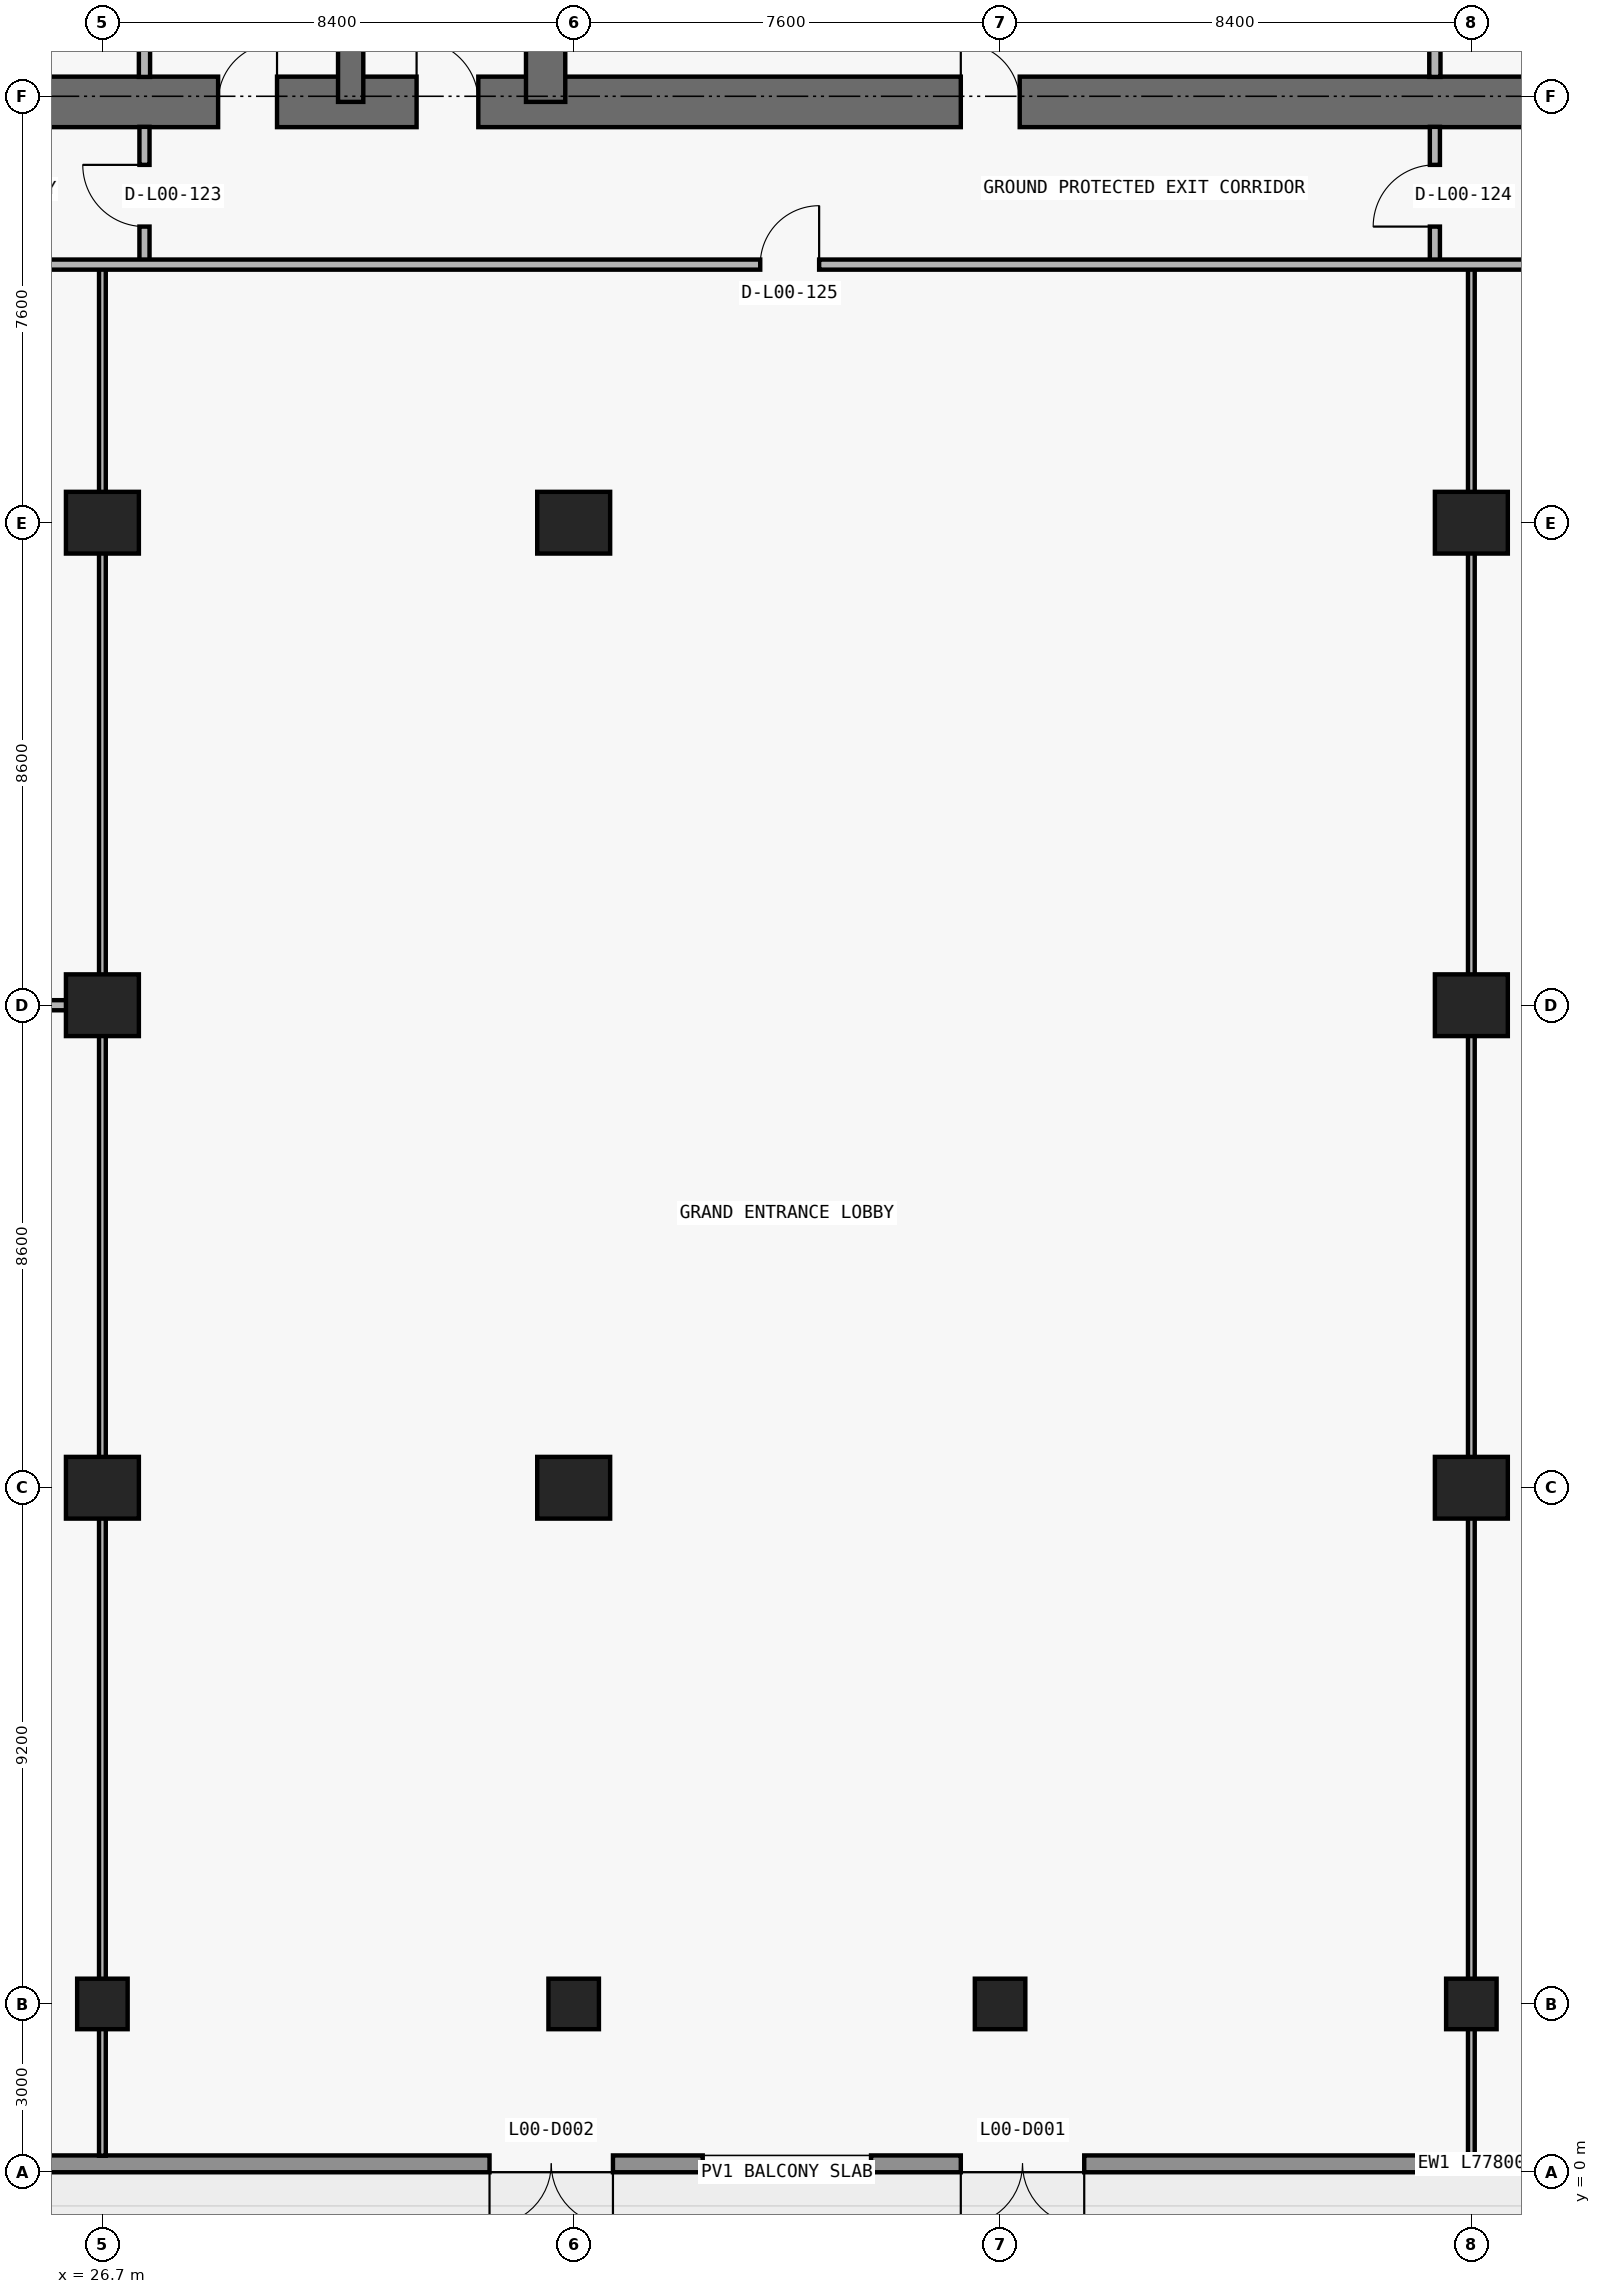
"""IFC4 building model, lengths in metres.
Left out: names, types, materials, properties, quantities, classifications, styles, units other than length and angle.
Written with IfcOpenShell. Run it as: python <this file> out.ifc"""

import sys

from ifc_helpers import new_model, si_unit, direction, frame, frame_2d, origin, origin_2d, place, context, subcontext, project, spatial, rectangle, circle, extrude, element, fill, save


model = new_model("IFC4")
c1 = context("Model", 3, precision=1e-05, world=origin(), true_north=direction((0.0, 1.0)))
c2 = subcontext(c1, "Body", "Model", "MODEL_VIEW")
j1 = project(units=[si_unit("LENGTHUNIT", "METRE"), si_unit("PLANEANGLEUNIT", "RADIAN")], contexts=[c1])
p1 = place(None, origin())
s1 = spatial("IfcSite", under=j1, at=p1, CompositionType="ELEMENT")
p2 = place(p1, origin())
s2 = spatial("IfcBuilding", under=s1, at=p2, CompositionType="ELEMENT")
p3 = place(p2, origin())
s3 = spatial("IfcBuildingStorey", under=s2, at=p3, CompositionType="ELEMENT", Elevation=0.0)
for number, where, z_axis, x_axis in (
    (1, (26.7, 3.0, 0.0), (0.0, 0.0, 1.0), (1.0, 0.0, 0.0)),
    (2, (35.1, 3.0, 0.0), (0.0, 0.0, 1.0), (1.0, 0.0, 0.0)),
    (3, (42.7, 3.0, 0.0), (0.0, 0.0, 1.0), (1.0, 0.0, 0.0)),
    (4, (51.1, 3.0, 0.0), (0.0, 0.0, 1.0), (1.0, 0.0, 0.0)),
):
    element("IfcColumn", number, at=place(p3, frame(where, z_axis=z_axis, x_axis=x_axis)), inside=s3, PredefinedType="COLUMN", context=c2, shape_type="SweptSolid", body=[
        extrude(circle(Radius=0.45, at=origin_2d()), origin(), (0.0, 0.0, 1.0), 5.1),
    ])
for number, where, z_axis, x_axis in (
    (5, (26.7, 12.2, 0.0), (0.0, 0.0, 1.0), (1.0, 0.0, 0.0)),
    (6, (35.1, 12.2, 0.0), (0.0, 0.0, 1.0), (1.0, 0.0, 0.0)),
    (7, (51.1, 12.2, 0.0), (0.0, 0.0, 1.0), (1.0, 0.0, 0.0)),
    (8, (26.7, 20.8, 0.0), (0.0, 0.0, 1.0), (1.0, 0.0, 0.0)),
    (9, (51.1, 20.8, 0.0), (0.0, 0.0, 1.0), (1.0, 0.0, 0.0)),
    (10, (26.7, 29.4, 0.0), (0.0, 0.0, 1.0), (1.0, 0.0, 0.0)),
    (11, (35.1, 29.4, 0.0), (0.0, 0.0, 1.0), (1.0, 0.0, 0.0)),
    (12, (51.1, 29.4, 0.0), (0.0, 0.0, 1.0), (1.0, 0.0, 0.0)),
):
    element("IfcColumn", number, at=place(p3, frame(where, z_axis=z_axis, x_axis=x_axis)), inside=s3, PredefinedType="COLUMN", context=c2, shape_type="SweptSolid", body=[
        extrude(rectangle(XDim=1.3, YDim=1.1, at=origin_2d()), origin(), (0.0, 0.0, 1.0), 5.1),
    ])
p4 = place(p3, frame((17.75, 36.9, 0.0), z_axis=(0.0, 0.0, 1.0), x_axis=(1.0, 0.0, 0.0)))
e13 = element("IfcWall", 13, at=p4, inside=s3, PredefinedType="SHEAR", context=c2, shape_type="SweptSolid", body=[
    extrude(rectangle(XDim=42.3, YDim=0.9, at=frame_2d((21.15, 0.0))), origin(), (0.0, 0.0, 1.0), 5.1),
])
p5 = place(p4, frame((14.55, 0.0, 0.0)))
e14 = element("IfcOpeningElement", 14, at=p5, cuts=e13, PredefinedType="OPENING", context=c2, shape_type="SweptSolid", body=[
    extrude(rectangle(XDim=1.1, YDim=2.15, at=frame_2d((0.55, 1.075))), frame((0.0, 0.46, 0.0), z_axis=(0.0, -1.0, 0.0), x_axis=(1.0, 0.0, 0.0)), (0.0, 0.0, 1.0), 0.92),
])
p6 = place(p4, frame((6.4, 0.0, 0.0)))
e15 = element("IfcOpeningElement", 15, at=p6, cuts=e13, PredefinedType="OPENING", context=c2, shape_type="SweptSolid", body=[
    extrude(rectangle(XDim=1.05, YDim=2.15, at=frame_2d((0.525, 1.075))), frame((0.0, 0.46, 0.0), z_axis=(0.0, -1.0, 0.0), x_axis=(1.0, 0.0, 0.0)), (0.0, 0.0, 1.0), 0.92),
])
p7 = place(p4, frame((34.9, 0.0, 0.0)))
e16 = element("IfcOpeningElement", 16, at=p7, cuts=e13, PredefinedType="OPENING", context=c2, shape_type="SweptSolid", body=[
    extrude(rectangle(XDim=1.05, YDim=2.15, at=frame_2d((0.525, 1.075))), frame((0.0, 0.46, 0.0), z_axis=(0.0, -1.0, 0.0), x_axis=(1.0, 0.0, 0.0)), (0.0, 0.0, 1.0), 0.92),
])
p8 = place(p4, frame((11.012, 0.0, 0.0)))
e17 = element("IfcOpeningElement", 17, at=p8, cuts=e13, PredefinedType="OPENING", context=c2, shape_type="SweptSolid", body=[
    extrude(rectangle(XDim=1.05, YDim=2.15, at=frame_2d((0.525, 1.075))), frame((0.0, 0.46, 0.0), z_axis=(0.0, -1.0, 0.0), x_axis=(1.0, 0.0, 0.0)), (0.0, 0.0, 1.0), 0.92),
])
p9 = place(p4, frame((24.25, 0.0, 0.0)))
e18 = element("IfcOpeningElement", 18, at=p9, cuts=e13, PredefinedType="OPENING", context=c2, shape_type="SweptSolid", body=[
    extrude(rectangle(XDim=1.05, YDim=2.15, at=frame_2d((0.525, 1.075))), frame((0.0, 0.46, 0.0), z_axis=(0.0, -1.0, 0.0), x_axis=(1.0, 0.0, 0.0)), (0.0, 0.0, 1.0), 0.92),
])
p10 = place(p3, frame((31.125, 36.9, 0.0), z_axis=(0.0, 0.0, 1.0), x_axis=(0.0, 1.0, 0.0)))
e19 = element("IfcWall", 19, at=p10, inside=s3, PredefinedType="SHEAR", context=c2, shape_type="SweptSolid", body=[
    extrude(rectangle(XDim=9.675, YDim=0.45, at=frame_2d((4.837, 0.0))), origin(), (0.0, 0.0, 1.0), 5.1),
])
p11 = place(p3, frame((34.6, 36.9, 0.0), z_axis=(0.0, 0.0, 1.0), x_axis=(0.0, 1.0, 0.0)))
e20 = element("IfcWall", 20, at=p11, inside=s3, PredefinedType="SHEAR", context=c2, shape_type="SweptSolid", body=[
    extrude(rectangle(XDim=9.675, YDim=0.7, at=frame_2d((4.837, 0.0))), origin(), (0.0, 0.0, 1.0), 5.1),
])
p12 = place(p3, frame((77.8, 0.15, 0.0), z_axis=(0.0, 0.0, 1.0), x_axis=(-1.0, 0.0, 0.0)))
e21 = element("IfcWall", 21, at=p12, inside=s3, PredefinedType="STANDARD", context=c2, shape_type="SweptSolid", body=[
    extrude(rectangle(XDim=77.8, YDim=0.3, at=frame_2d((38.9, 0.0))), origin(), (0.0, 0.0, 1.0), 5.1),
])
p13 = place(p12, frame((2.6, 0.0, 0.0)))
e22 = element("IfcOpeningElement", 22, at=p13, cuts=e21, PredefinedType="OPENING", context=c2, shape_type="SweptSolid", body=[
    extrude(rectangle(XDim=3.6, YDim=3.8, at=frame_2d((1.8, 1.9))), frame((0.0, 0.16, 0.0), z_axis=(0.0, -1.0, 0.0), x_axis=(1.0, 0.0, 0.0)), (0.0, 0.0, 1.0), 0.32),
])
p14 = place(p12, frame((17.6, 0.0, 0.0)))
e23 = element("IfcOpeningElement", 23, at=p14, cuts=e21, PredefinedType="OPENING", context=c2, shape_type="SweptSolid", body=[
    extrude(rectangle(XDim=2.2, YDim=2.6, at=frame_2d((1.1, 1.3))), frame((0.0, 0.16, 0.0), z_axis=(0.0, -1.0, 0.0), x_axis=(1.0, 0.0, 0.0)), (0.0, 0.0, 1.0), 0.32),
])
p15 = place(p12, frame((12.0, 0.0, 0.6)))
e24 = element("IfcOpeningElement", 24, at=p15, cuts=e21, PredefinedType="OPENING", context=c2, shape_type="SweptSolid", body=[
    extrude(rectangle(XDim=3.0, YDim=2.4, at=frame_2d((1.5, 1.2))), frame((0.0, 0.16, 0.0), z_axis=(0.0, -1.0, 0.0), x_axis=(1.0, 0.0, 0.0)), (0.0, 0.0, 1.0), 0.32),
])
p16 = place(p12, frame((33.6, 0.0, 0.0)))
e25 = element("IfcOpeningElement", 25, at=p16, cuts=e21, PredefinedType="OPENING", context=c2, shape_type="SweptSolid", body=[
    extrude(rectangle(XDim=2.2, YDim=2.6, at=frame_2d((1.1, 1.3))), frame((0.0, 0.16, 0.0), z_axis=(0.0, -1.0, 0.0), x_axis=(1.0, 0.0, 0.0)), (0.0, 0.0, 1.0), 0.32),
])
p17 = place(p12, frame((42.0, 0.0, 0.0)))
e26 = element("IfcOpeningElement", 26, at=p17, cuts=e21, PredefinedType="OPENING", context=c2, shape_type="SweptSolid", body=[
    extrude(rectangle(XDim=2.2, YDim=2.6, at=frame_2d((1.1, 1.3))), frame((0.0, 0.16, 0.0), z_axis=(0.0, -1.0, 0.0), x_axis=(1.0, 0.0, 0.0)), (0.0, 0.0, 1.0), 0.32),
])
p18 = place(p12, frame((37.4, 0.0, 0.6)))
e27 = element("IfcOpeningElement", 27, at=p18, cuts=e21, PredefinedType="OPENING", context=c2, shape_type="SweptSolid", body=[
    extrude(rectangle(XDim=3.0, YDim=2.4, at=frame_2d((1.5, 1.2))), frame((0.0, 0.16, 0.0), z_axis=(0.0, -1.0, 0.0), x_axis=(1.0, 0.0, 0.0)), (0.0, 0.0, 1.0), 0.32),
])
p19 = place(p12, frame((63.6, 0.0, 0.0)))
e28 = element("IfcOpeningElement", 28, at=p19, cuts=e21, PredefinedType="OPENING", context=c2, shape_type="SweptSolid", body=[
    extrude(rectangle(XDim=2.2, YDim=2.6, at=frame_2d((1.1, 1.3))), frame((0.0, 0.16, 0.0), z_axis=(0.0, -1.0, 0.0), x_axis=(1.0, 0.0, 0.0)), (0.0, 0.0, 1.0), 0.32),
])
p20 = place(p12, frame((56.0, 0.0, 0.6)))
e29 = element("IfcOpeningElement", 29, at=p20, cuts=e21, PredefinedType="OPENING", context=c2, shape_type="SweptSolid", body=[
    extrude(rectangle(XDim=3.0, YDim=2.4, at=frame_2d((1.5, 1.2))), frame((0.0, 0.16, 0.0), z_axis=(0.0, -1.0, 0.0), x_axis=(1.0, 0.0, 0.0)), (0.0, 0.0, 1.0), 0.32),
])
p21 = place(p3, frame((26.7, 0.295, 0.0), z_axis=(0.0, 0.0, 1.0), x_axis=(0.0, 1.0, 0.0)))
e30 = element("IfcWall", 30, at=p21, inside=s3, PredefinedType="PARTITIONING", context=c2, shape_type="SweptSolid", body=[
    extrude(rectangle(XDim=33.705, YDim=0.12, at=frame_2d((16.853, 0.0))), origin(), (0.0, 0.0, 1.0), 4.064),
])
p22 = place(p3, frame((27.45, 34.0, 0.0), z_axis=(0.0, 0.0, 1.0), x_axis=(0.0, 1.0, 0.0)))
e31 = element("IfcWall", 31, at=p22, inside=s3, PredefinedType="PARTITIONING", context=c2, shape_type="SweptSolid", body=[
    extrude(rectangle(XDim=2.455, YDim=0.18, at=frame_2d((1.228, 0.0))), origin(), (0.0, 0.0, 1.0), 5.1),
])
p23 = place(p22, frame((0.677, 0.0, 0.0)))
e32 = element("IfcOpeningElement", 32, at=p23, cuts=e31, PredefinedType="OPENING", context=c2, shape_type="SweptSolid", body=[
    extrude(rectangle(XDim=1.1, YDim=2.15, at=frame_2d((0.55, 1.075))), frame((0.0, 0.1, 0.0), z_axis=(0.0, -1.0, 0.0), x_axis=(1.0, 0.0, 0.0)), (0.0, 0.0, 1.0), 0.2),
])
p24 = place(p3, frame((27.45, 37.345, 0.0), z_axis=(0.0, 0.0, 1.0), x_axis=(0.0, 1.0, 0.0)))
e33 = element("IfcWall", 33, at=p24, inside=s3, PredefinedType="PARTITIONING", context=c2, shape_type="SweptSolid", body=[
    extrude(rectangle(XDim=5.385, YDim=0.2, at=frame_2d((2.692, 0.0))), origin(), (0.0, 0.0, 1.0), 5.1),
])
p25 = place(p3, frame((50.45, 34.0, 0.0), z_axis=(0.0, 0.0, 1.0), x_axis=(0.0, 1.0, 0.0)))
e34 = element("IfcWall", 34, at=p25, inside=s3, PredefinedType="PARTITIONING", context=c2, shape_type="SweptSolid", body=[
    extrude(rectangle(XDim=2.455, YDim=0.18, at=frame_2d((1.228, 0.0))), origin(), (0.0, 0.0, 1.0), 5.1),
])
p26 = place(p25, frame((0.677, 0.0, 0.0)))
e35 = element("IfcOpeningElement", 35, at=p26, cuts=e34, PredefinedType="OPENING", context=c2, shape_type="SweptSolid", body=[
    extrude(rectangle(XDim=1.1, YDim=2.15, at=frame_2d((0.55, 1.075))), frame((0.0, 0.1, 0.0), z_axis=(0.0, -1.0, 0.0), x_axis=(1.0, 0.0, 0.0)), (0.0, 0.0, 1.0), 0.2),
])
p27 = place(p3, frame((50.45, 37.345, 0.0), z_axis=(0.0, 0.0, 1.0), x_axis=(0.0, 1.0, 0.0)))
e36 = element("IfcWall", 36, at=p27, inside=s3, PredefinedType="PARTITIONING", context=c2, shape_type="SweptSolid", body=[
    extrude(rectangle(XDim=5.385, YDim=0.2, at=frame_2d((2.692, 0.0))), origin(), (0.0, 0.0, 1.0), 5.1),
])
p28 = place(p3, frame((51.1, 0.295, 0.0), z_axis=(0.0, 0.0, 1.0), x_axis=(0.0, 1.0, 0.0)))
e37 = element("IfcWall", 37, at=p28, inside=s3, PredefinedType="PARTITIONING", context=c2, shape_type="SweptSolid", body=[
    extrude(rectangle(XDim=33.705, YDim=0.12, at=frame_2d((16.853, 0.0))), origin(), (0.0, 0.0, 1.0), 4.064),
])
p29 = place(p3, frame((0.295, 20.8, 0.0), z_axis=(0.0, 0.0, 1.0), x_axis=(1.0, 0.0, 0.0)))
e38 = element("IfcWall", 38, at=p29, inside=s3, PredefinedType="PARTITIONING", context=c2, shape_type="SweptSolid", body=[
    extrude(rectangle(XDim=26.405, YDim=0.18, at=frame_2d((13.203, 0.0))), origin(), (0.0, 0.0, 1.0), 4.064),
])
p30 = place(p29, frame((12.677, 0.0, 0.0)))
e39 = element("IfcOpeningElement", 39, at=p30, cuts=e38, PredefinedType="OPENING", context=c2, shape_type="SweptSolid", body=[
    extrude(rectangle(XDim=1.05, YDim=2.15, at=frame_2d((0.525, 1.075))), frame((0.0, 0.1, 0.0), z_axis=(0.0, -1.0, 0.0), x_axis=(1.0, 0.0, 0.0)), (0.0, 0.0, 1.0), 0.2),
])
p31 = place(p3, frame((0.295, 34.0, 0.0), z_axis=(0.0, 0.0, 1.0), x_axis=(1.0, 0.0, 0.0)))
e40 = element("IfcWall", 40, at=p31, inside=s3, PredefinedType="PARTITIONING", context=c2, shape_type="SweptSolid", body=[
    extrude(rectangle(XDim=69.305, YDim=0.18, at=frame_2d((34.653, 0.0))), origin(), (0.0, 0.0, 1.0), 5.1),
])
p32 = place(p31, frame((38.13, 0.0, 0.0)))
e41 = element("IfcOpeningElement", 41, at=p32, cuts=e40, PredefinedType="OPENING", context=c2, shape_type="SweptSolid", body=[
    extrude(rectangle(XDim=1.05, YDim=2.15, at=frame_2d((0.525, 1.075))), frame((0.0, 0.1, 0.0), z_axis=(0.0, -1.0, 0.0), x_axis=(1.0, 0.0, 0.0)), (0.0, 0.0, 1.0), 0.2),
])
p33 = place(p31, frame((12.752, 0.0, 0.0)))
e42 = element("IfcOpeningElement", 42, at=p33, cuts=e40, PredefinedType="OPENING", context=c2, shape_type="SweptSolid", body=[
    extrude(rectangle(XDim=0.9, YDim=2.15, at=frame_2d((0.45, 1.075))), frame((0.0, 0.1, 0.0), z_axis=(0.0, -1.0, 0.0), x_axis=(1.0, 0.0, 0.0)), (0.0, 0.0, 1.0), 0.2),
])
p34 = place(p31, frame((54.53, 0.0, 0.0)))
e43 = element("IfcOpeningElement", 43, at=p34, cuts=e40, PredefinedType="OPENING", context=c2, shape_type="SweptSolid", body=[
    extrude(rectangle(XDim=1.05, YDim=2.15, at=frame_2d((0.525, 1.075))), frame((0.0, 0.1, 0.0), z_axis=(0.0, -1.0, 0.0), x_axis=(1.0, 0.0, 0.0)), (0.0, 0.0, 1.0), 0.2),
])
p35 = place(p16, origin())
e44 = element("IfcDoor", 44, at=p35, inside=s3, OperationType="DOUBLE_DOOR_SINGLE_SWING", PredefinedType="DOOR", context=c2, shape_type="SweptSolid", body=[
    extrude(rectangle(XDim=2.2, YDim=2.6, at=frame_2d((1.1, 1.3))), frame((0.0, 0.025, 0.0), z_axis=(0.0, -1.0, 0.0), x_axis=(1.0, 0.0, 0.0)), (0.0, 0.0, 1.0), 0.05),
])
fill(e25, e44)
p36 = place(p17, origin())
e45 = element("IfcDoor", 45, at=p36, inside=s3, OperationType="DOUBLE_DOOR_SINGLE_SWING", PredefinedType="DOOR", context=c2, shape_type="SweptSolid", body=[
    extrude(rectangle(XDim=2.2, YDim=2.6, at=frame_2d((1.1, 1.3))), frame((0.0, 0.025, 0.0), z_axis=(0.0, -1.0, 0.0), x_axis=(1.0, 0.0, 0.0)), (0.0, 0.0, 1.0), 0.05),
])
fill(e26, e45)
p37 = place(p18, origin())
e46 = element("IfcWindow", 46, at=p37, inside=s3, PartitioningType="SINGLE_PANEL", PredefinedType="WINDOW", context=c2, shape_type="SweptSolid", body=[
    extrude(rectangle(XDim=3.0, YDim=2.4, at=frame_2d((1.5, 1.2))), frame((0.0, 0.03, 0.0), z_axis=(0.0, -1.0, 0.0), x_axis=(1.0, 0.0, 0.0)), (0.0, 0.0, 1.0), 0.06),
])
fill(e27, e46)
p38 = place(p5, origin())
e47 = element("IfcDoor", 47, at=p38, inside=s3, OperationType="SINGLE_SWING_LEFT", PredefinedType="DOOR", context=c2, shape_type="SweptSolid", body=[
    extrude(rectangle(XDim=1.1, YDim=2.15, at=frame_2d((0.55, 1.075))), frame((0.0, 0.025, 0.0), z_axis=(0.0, -1.0, 0.0), x_axis=(1.0, 0.0, 0.0)), (0.0, 0.0, 1.0), 0.05),
])
fill(e14, e47)
p39 = place(p8, origin())
e48 = element("IfcDoor", 48, at=p39, inside=s3, OperationType="SINGLE_SWING_RIGHT", PredefinedType="DOOR", context=c2, shape_type="SweptSolid", body=[
    extrude(rectangle(XDim=1.05, YDim=2.15, at=frame_2d((0.525, 1.075))), frame((0.0, 0.025, 0.0), z_axis=(0.0, -1.0, 0.0), x_axis=(1.0, 0.0, 0.0)), (0.0, 0.0, 1.0), 0.05),
])
fill(e17, e48)
p40 = place(p9, origin())
e49 = element("IfcDoor", 49, at=p40, inside=s3, OperationType="SINGLE_SWING_LEFT", PredefinedType="DOOR", context=c2, shape_type="SweptSolid", body=[
    extrude(rectangle(XDim=1.05, YDim=2.15, at=frame_2d((0.525, 1.075))), frame((0.0, 0.025, 0.0), z_axis=(0.0, -1.0, 0.0), x_axis=(1.0, 0.0, 0.0)), (0.0, 0.0, 1.0), 0.05),
])
fill(e18, e49)
p41 = place(p23, origin())
e50 = element("IfcDoor", 50, at=p41, inside=s3, OperationType="SINGLE_SWING_RIGHT", PredefinedType="DOOR", context=c2, shape_type="SweptSolid", body=[
    extrude(rectangle(XDim=1.1, YDim=2.15, at=frame_2d((0.55, 1.075))), frame((0.0, 0.025, 0.0), z_axis=(0.0, -1.0, 0.0), x_axis=(1.0, 0.0, 0.0)), (0.0, 0.0, 1.0), 0.05),
])
fill(e32, e50)
p42 = place(p26, origin())
e51 = element("IfcDoor", 51, at=p42, inside=s3, OperationType="SINGLE_SWING_LEFT", PredefinedType="DOOR", context=c2, shape_type="SweptSolid", body=[
    extrude(rectangle(XDim=1.1, YDim=2.15, at=frame_2d((0.55, 1.075))), frame((0.0, 0.025, 0.0), z_axis=(0.0, -1.0, 0.0), x_axis=(1.0, 0.0, 0.0)), (0.0, 0.0, 1.0), 0.05),
])
fill(e35, e51)
p43 = place(p32, origin())
e52 = element("IfcDoor", 52, at=p43, inside=s3, OperationType="SINGLE_SWING_RIGHT", PredefinedType="DOOR", context=c2, shape_type="SweptSolid", body=[
    extrude(rectangle(XDim=1.05, YDim=2.15, at=frame_2d((0.525, 1.075))), frame((0.0, 0.025, 0.0), z_axis=(0.0, -1.0, 0.0), x_axis=(1.0, 0.0, 0.0)), (0.0, 0.0, 1.0), 0.05),
])
fill(e41, e52)
save(model, sys.argv[1])
